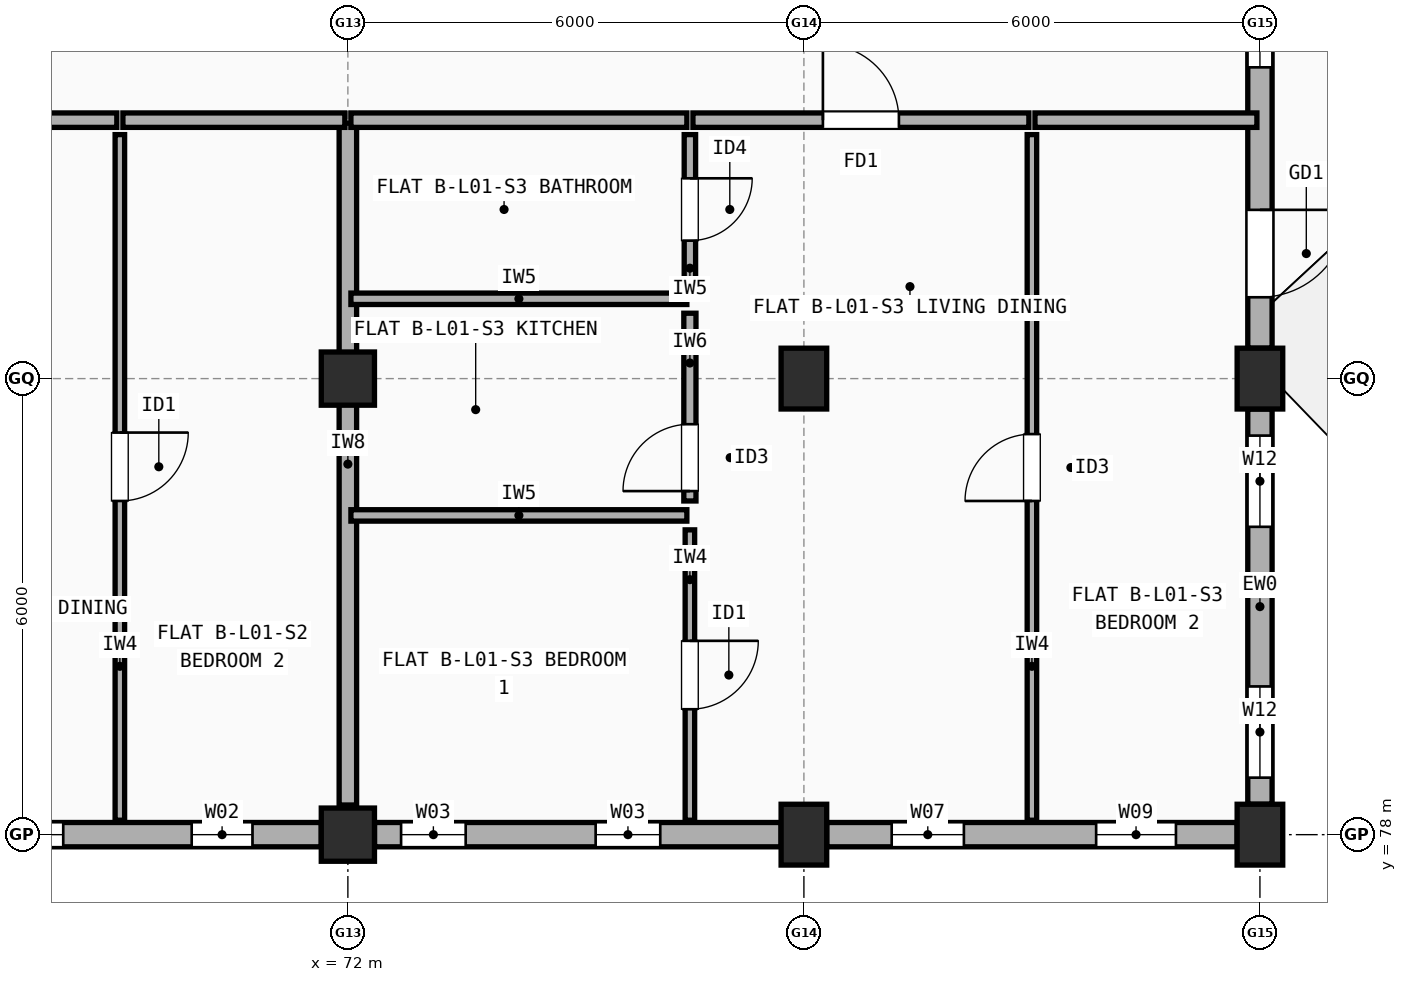
"""IFC4 building model, lengths in metres.
Left out: names, types, materials, properties, quantities, classifications, styles, units other than length and angle.
Written with IfcOpenShell. Run it as: python <this file> out.ifc"""

import sys

from ifc_helpers import new_model, si_unit, direction, frame, frame_2d, origin, origin_2d, place, context, subcontext, project, spatial, rectangle, extrude, element, fill, save


model = new_model("IFC4")
c1 = context("Model", 3, precision=1e-05, world=origin(), true_north=direction((0.0, 1.0)))
c2 = subcontext(c1, "Body", "Model", "MODEL_VIEW")
j1 = project(units=[si_unit("LENGTHUNIT", "METRE"), si_unit("PLANEANGLEUNIT", "RADIAN")], contexts=[c1])
p1 = place(None, origin())
s1 = spatial("IfcSite", under=j1, at=p1, CompositionType="ELEMENT")
p2 = place(p1, origin())
s2 = spatial("IfcBuilding", under=s1, at=p2, CompositionType="ELEMENT")
p3 = place(p2, frame((0.0, 0.0, 4.5)))
s3 = spatial("IfcBuildingStorey", under=s2, at=p3, CompositionType="ELEMENT", Elevation=4.5)
for number, where, z_axis, x_axis in (
    (1, (72.0, 78.0, 0.0), (0.0, 0.0, 1.0), (1.0, 0.0, 0.0)),
    (2, (72.0, 84.0, 0.0), (0.0, 0.0, 1.0), (1.0, 0.0, 0.0)),
):
    element("IfcColumn", number, at=place(p3, frame(where, z_axis=z_axis, x_axis=x_axis)), inside=s3, PredefinedType="COLUMN", context=c2, shape_type="SweptSolid", body=[
        extrude(rectangle(XDim=0.7, YDim=0.7, at=origin_2d()), origin(), (0.0, 0.0, 1.0), 2.945),
    ])
for number, where, z_axis, x_axis in (
    (3, (78.0, 78.0, 0.0), (0.0, 0.0, 1.0), (1.0, 0.0, 0.0)),
    (4, (78.0, 84.0, 0.0), (0.0, 0.0, 1.0), (1.0, 0.0, 0.0)),
    (5, (84.0, 78.0, 0.0), (0.0, 0.0, 1.0), (1.0, 0.0, 0.0)),
    (6, (84.0, 84.0, 0.0), (0.0, 0.0, 1.0), (1.0, 0.0, 0.0)),
):
    element("IfcColumn", number, at=place(p3, frame(where, z_axis=z_axis, x_axis=x_axis)), inside=s3, PredefinedType="COLUMN", context=c2, shape_type="SweptSolid", body=[
        extrude(rectangle(XDim=0.6, YDim=0.8, at=origin_2d()), origin(), (0.0, 0.0, 1.0), 2.945),
    ])
p4 = place(p3, frame((66.35, 78.0, 0.0), z_axis=(0.0, 0.0, 1.0), x_axis=(1.0, 0.0, 0.0)))
e7 = element("IfcWall", 7, at=p4, inside=s3, PredefinedType="STANDARD", context=c2, shape_type="SweptSolid", body=[
    extrude(rectangle(XDim=5.3, YDim=0.32, at=frame_2d((2.65, 0.0))), origin(), (0.0, 0.0, 1.0), 2.427),
])
p5 = place(p4, frame((0.705, 0.0, 0.9)))
e8 = element("IfcOpeningElement", 8, at=p5, cuts=e7, PredefinedType="OPENING", context=c2, shape_type="SweptSolid", body=[
    extrude(rectangle(XDim=1.2, YDim=1.35, at=frame_2d((0.6, 0.675))), frame((0.0, 0.17, 0.0), z_axis=(0.0, -1.0, 0.0), x_axis=(1.0, 0.0, 0.0)), (0.0, 0.0, 1.0), 0.34),
])
p6 = place(p4, frame((3.595, 0.0, 0.9)))
e9 = element("IfcOpeningElement", 9, at=p6, cuts=e7, PredefinedType="OPENING", context=c2, shape_type="SweptSolid", body=[
    extrude(rectangle(XDim=0.8, YDim=1.2, at=frame_2d((0.4, 0.6))), frame((0.0, 0.17, 0.0), z_axis=(0.0, -1.0, 0.0), x_axis=(1.0, 0.0, 0.0)), (0.0, 0.0, 1.0), 0.34),
])
p7 = place(p3, frame((72.35, 78.0, 0.0), z_axis=(0.0, 0.0, 1.0), x_axis=(1.0, 0.0, 0.0)))
e10 = element("IfcWall", 10, at=p7, inside=s3, PredefinedType="STANDARD", context=c2, shape_type="SweptSolid", body=[
    extrude(rectangle(XDim=5.35, YDim=0.32, at=frame_2d((2.675, 0.0))), origin(), (0.0, 0.0, 1.0), 2.427),
])
p8 = place(p7, frame((0.35, 0.0, 0.9)))
e11 = element("IfcOpeningElement", 11, at=p8, cuts=e10, PredefinedType="OPENING", context=c2, shape_type="SweptSolid", body=[
    extrude(rectangle(XDim=0.85, YDim=1.25, at=frame_2d((0.425, 0.625))), frame((0.0, 0.17, 0.0), z_axis=(0.0, -1.0, 0.0), x_axis=(1.0, 0.0, 0.0)), (0.0, 0.0, 1.0), 0.34),
])
p9 = place(p7, frame((2.91, 0.0, 0.9)))
e12 = element("IfcOpeningElement", 12, at=p9, cuts=e10, PredefinedType="OPENING", context=c2, shape_type="SweptSolid", body=[
    extrude(rectangle(XDim=0.85, YDim=1.25, at=frame_2d((0.425, 0.625))), frame((0.0, 0.17, 0.0), z_axis=(0.0, -1.0, 0.0), x_axis=(1.0, 0.0, 0.0)), (0.0, 0.0, 1.0), 0.34),
])
p10 = place(p3, frame((78.3, 78.0, 0.0), z_axis=(0.0, 0.0, 1.0), x_axis=(1.0, 0.0, 0.0)))
e13 = element("IfcWall", 13, at=p10, inside=s3, PredefinedType="STANDARD", context=c2, shape_type="SweptSolid", body=[
    extrude(rectangle(XDim=5.4, YDim=0.32, at=frame_2d((2.7, 0.0))), origin(), (0.0, 0.0, 1.0), 2.427),
])
p11 = place(p10, frame((0.855, 0.0, 0.9)))
e14 = element("IfcOpeningElement", 14, at=p11, cuts=e13, PredefinedType="OPENING", context=c2, shape_type="SweptSolid", body=[
    extrude(rectangle(XDim=0.95, YDim=1.35, at=frame_2d((0.475, 0.675))), frame((0.0, 0.17, 0.0), z_axis=(0.0, -1.0, 0.0), x_axis=(1.0, 0.0, 0.0)), (0.0, 0.0, 1.0), 0.34),
])
p12 = place(p10, frame((3.545, 0.0, 0.9)))
e15 = element("IfcOpeningElement", 15, at=p12, cuts=e13, PredefinedType="OPENING", context=c2, shape_type="SweptSolid", body=[
    extrude(rectangle(XDim=1.05, YDim=1.35, at=frame_2d((0.525, 0.675))), frame((0.0, 0.17, 0.0), z_axis=(0.0, -1.0, 0.0), x_axis=(1.0, 0.0, 0.0)), (0.0, 0.0, 1.0), 0.34),
])
p13 = place(p3, frame((84.0, 78.4, 0.0), z_axis=(0.0, 0.0, 1.0), x_axis=(0.0, 1.0, 0.0)))
e16 = element("IfcWall", 16, at=p13, inside=s3, PredefinedType="STANDARD", context=c2, shape_type="SweptSolid", body=[
    extrude(rectangle(XDim=5.2, YDim=0.32, at=frame_2d((2.6, 0.0))), origin(), (0.0, 0.0, 1.0), 2.427),
])
p14 = place(p13, frame((0.35, 0.0, 0.9)))
e17 = element("IfcOpeningElement", 17, at=p14, cuts=e16, PredefinedType="OPENING", context=c2, shape_type="SweptSolid", body=[
    extrude(rectangle(XDim=1.2, YDim=1.35, at=frame_2d((0.6, 0.675))), frame((0.0, 0.17, 0.0), z_axis=(0.0, -1.0, 0.0), x_axis=(1.0, 0.0, 0.0)), (0.0, 0.0, 1.0), 0.34),
])
p15 = place(p13, frame((3.65, 0.0, 0.9)))
e18 = element("IfcOpeningElement", 18, at=p15, cuts=e16, PredefinedType="OPENING", context=c2, shape_type="SweptSolid", body=[
    extrude(rectangle(XDim=1.2, YDim=1.35, at=frame_2d((0.6, 0.675))), frame((0.0, 0.17, 0.0), z_axis=(0.0, -1.0, 0.0), x_axis=(1.0, 0.0, 0.0)), (0.0, 0.0, 1.0), 0.34),
])
p16 = place(p3, frame((84.0, 84.4, 0.0), z_axis=(0.0, 0.0, 1.0), x_axis=(0.0, 1.0, 0.0)))
e19 = element("IfcWall", 19, at=p16, inside=s3, PredefinedType="STANDARD", context=c2, shape_type="SweptSolid", body=[
    extrude(rectangle(XDim=5.2, YDim=0.32, at=frame_2d((2.6, 0.0))), origin(), (0.0, 0.0, 1.0), 2.427),
])
p17 = place(p16, frame((0.67, 0.0, 0.0)))
e20 = element("IfcOpeningElement", 20, at=p17, cuts=e19, PredefinedType="OPENING", context=c2, shape_type="SweptSolid", body=[
    extrude(rectangle(XDim=1.15, YDim=2.15, at=frame_2d((0.575, 1.075))), frame((0.0, 0.17, 0.0), z_axis=(0.0, -1.0, 0.0), x_axis=(1.0, 0.0, 0.0)), (0.0, 0.0, 1.0), 0.34),
])
p18 = place(p16, frame((3.695, 0.0, 0.9)))
e21 = element("IfcOpeningElement", 21, at=p18, cuts=e19, PredefinedType="OPENING", context=c2, shape_type="SweptSolid", body=[
    extrude(rectangle(XDim=0.85, YDim=1.25, at=frame_2d((0.425, 0.625))), frame((0.0, 0.17, 0.0), z_axis=(0.0, -1.0, 0.0), x_axis=(1.0, 0.0, 0.0)), (0.0, 0.0, 1.0), 0.34),
])
p19 = place(p3, frame((72.0, 78.39, 0.0), z_axis=(0.0, 0.0, 1.0), x_axis=(0.0, 1.0, 0.0)))
e22 = element("IfcWall", 22, at=p19, inside=s3, PredefinedType="SOLIDWALL", context=c2, shape_type="SweptSolid", body=[
    extrude(rectangle(XDim=8.97, YDim=0.23, at=frame_2d((4.485, 0.0))), origin(), (0.0, 0.0, 1.0), 2.327),
])
p20 = place(p3, frame((64.54, 87.4, 0.0), z_axis=(0.0, 0.0, 1.0), x_axis=(1.0, 0.0, 0.0)))
e23 = element("IfcWall", 23, at=p20, inside=s3, PredefinedType="SOLIDWALL", context=c2, shape_type="SweptSolid", body=[
    extrude(rectangle(XDim=4.42, YDim=0.19, at=frame_2d((2.21, 0.0))), origin(), (0.0, 0.0, 1.0), 2.327),
])
p21 = place(p20, frame((1.72, 0.0, 0.0)))
e24 = element("IfcOpeningElement", 24, at=p21, cuts=e23, PredefinedType="OPENING", context=c2, shape_type="SweptSolid", body=[
    extrude(rectangle(XDim=0.98, YDim=2.15, at=frame_2d((0.49, 1.075))), frame((0.0, 0.105, 0.0), z_axis=(0.0, -1.0, 0.0), x_axis=(1.0, 0.0, 0.0)), (0.0, 0.0, 1.0), 0.21),
])
p22 = place(p3, frame((69.04, 87.4, 0.0), z_axis=(0.0, 0.0, 1.0), x_axis=(1.0, 0.0, 0.0)))
e25 = element("IfcWall", 25, at=p22, inside=s3, PredefinedType="SOLIDWALL", context=c2, shape_type="SweptSolid", body=[
    extrude(rectangle(XDim=2.92, YDim=0.19, at=frame_2d((1.46, 0.0))), origin(), (0.0, 0.0, 1.0), 2.327),
])
p23 = place(p3, frame((69.0, 78.19, 0.0), z_axis=(0.0, 0.0, 1.0), x_axis=(0.0, 1.0, 0.0)))
e26 = element("IfcWall", 26, at=p23, inside=s3, PredefinedType="PARTITIONING", context=c2, shape_type="SweptSolid", body=[
    extrude(rectangle(XDim=9.02, YDim=0.125, at=frame_2d((4.51, 0.0))), origin(), (0.0, 0.0, 1.0), 2.427),
])
p24 = place(p23, frame((4.2, 0.0, 0.0)))
e27 = element("IfcOpeningElement", 27, at=p24, cuts=e26, PredefinedType="OPENING", context=c2, shape_type="SweptSolid", body=[
    extrude(rectangle(XDim=0.9, YDim=2.1, at=frame_2d((0.45, 1.05))), frame((0.0, 0.073, 0.0), z_axis=(0.0, -1.0, 0.0), x_axis=(1.0, 0.0, 0.0)), (0.0, 0.0, 1.0), 0.145),
])
p25 = place(p3, frame((72.04, 87.4, 0.0), z_axis=(0.0, 0.0, 1.0), x_axis=(1.0, 0.0, 0.0)))
e28 = element("IfcWall", 28, at=p25, inside=s3, PredefinedType="SOLIDWALL", context=c2, shape_type="SweptSolid", body=[
    extrude(rectangle(XDim=4.42, YDim=0.19, at=frame_2d((2.21, 0.0))), origin(), (0.0, 0.0, 1.0), 2.327),
])
p26 = place(p3, frame((76.54, 87.4, 0.0), z_axis=(0.0, 0.0, 1.0), x_axis=(1.0, 0.0, 0.0)))
e29 = element("IfcWall", 29, at=p26, inside=s3, PredefinedType="SOLIDWALL", context=c2, shape_type="SweptSolid", body=[
    extrude(rectangle(XDim=4.42, YDim=0.19, at=frame_2d((2.21, 0.0))), origin(), (0.0, 0.0, 1.0), 2.427),
])
p27 = place(p26, frame((1.71, 0.0, 0.0)))
e30 = element("IfcOpeningElement", 30, at=p27, cuts=e29, PredefinedType="OPENING", context=c2, shape_type="SweptSolid", body=[
    extrude(rectangle(XDim=1.0, YDim=2.15, at=frame_2d((0.5, 1.075))), frame((0.0, 0.105, 0.0), z_axis=(0.0, -1.0, 0.0), x_axis=(1.0, 0.0, 0.0)), (0.0, 0.0, 1.0), 0.21),
])
p28 = place(p3, frame((76.5, 78.19, 0.0), z_axis=(0.0, 0.0, 1.0), x_axis=(0.0, 1.0, 0.0)))
e31 = element("IfcWall", 31, at=p28, inside=s3, PredefinedType="PARTITIONING", context=c2, shape_type="SweptSolid", body=[
    extrude(rectangle(XDim=3.82, YDim=0.125, at=frame_2d((1.91, 0.0))), origin(), (0.0, 0.0, 1.0), 2.945),
])
p29 = place(p28, frame((1.46, 0.0, 0.0)))
e32 = element("IfcOpeningElement", 32, at=p29, cuts=e31, PredefinedType="OPENING", context=c2, shape_type="SweptSolid", body=[
    extrude(rectangle(XDim=0.9, YDim=2.1, at=frame_2d((0.45, 1.05))), frame((0.0, 0.073, 0.0), z_axis=(0.0, -1.0, 0.0), x_axis=(1.0, 0.0, 0.0)), (0.0, 0.0, 1.0), 0.145),
])
p30 = place(p3, frame((76.5, 82.39, 0.0), z_axis=(0.0, 0.0, 1.0), x_axis=(0.0, 1.0, 0.0)))
e33 = element("IfcWall", 33, at=p30, inside=s3, PredefinedType="PLUMBINGWALL", context=c2, shape_type="SweptSolid", body=[
    extrude(rectangle(XDim=2.47, YDim=0.16, at=frame_2d((1.235, 0.0))), origin(), (0.0, 0.0, 1.0), 2.427),
])
p31 = place(p30, frame((0.13, 0.0, 0.0)))
e34 = element("IfcOpeningElement", 34, at=p31, cuts=e33, PredefinedType="OPENING", context=c2, shape_type="SweptSolid", body=[
    extrude(rectangle(XDim=0.88, YDim=2.1, at=frame_2d((0.44, 1.05))), frame((0.0, 0.09, 0.0), z_axis=(0.0, -1.0, 0.0), x_axis=(1.0, 0.0, 0.0)), (0.0, 0.0, 1.0), 0.18),
])
p32 = place(p3, frame((76.5, 85.24, 0.0), z_axis=(0.0, 0.0, 1.0), x_axis=(0.0, 1.0, 0.0)))
e35 = element("IfcWall", 35, at=p32, inside=s3, PredefinedType="PARTITIONING", context=c2, shape_type="SweptSolid", body=[
    extrude(rectangle(XDim=1.97, YDim=0.15, at=frame_2d((0.985, 0.0))), origin(), (0.0, 0.0, 1.0), 2.945),
])
p33 = place(p32, frame((0.575, 0.0, 0.0)))
e36 = element("IfcOpeningElement", 36, at=p33, cuts=e35, PredefinedType="OPENING", context=c2, shape_type="SweptSolid", body=[
    extrude(rectangle(XDim=0.82, YDim=2.08, at=frame_2d((0.41, 1.04))), frame((0.0, 0.085, 0.0), z_axis=(0.0, -1.0, 0.0), x_axis=(1.0, 0.0, 0.0)), (0.0, 0.0, 1.0), 0.17),
])
for number, where, z_axis, x_axis in (
    (37, (72.04, 82.2, 0.0), (0.0, 0.0, 1.0), (1.0, 0.0, 0.0)),
    (38, (72.04, 85.05, 0.0), (0.0, 0.0, 1.0), (1.0, 0.0, 0.0)),
):
    element("IfcWall", number, at=place(p3, frame(where, z_axis=z_axis, x_axis=x_axis)), inside=s3, PredefinedType="PARTITIONING", context=c2, shape_type="SweptSolid", body=[
        extrude(rectangle(XDim=4.42, YDim=0.15, at=frame_2d((2.21, 0.0))), origin(), (0.0, 0.0, 1.0), 2.327),
    ])
p34 = place(p3, frame((81.04, 87.4, 0.0), z_axis=(0.0, 0.0, 1.0), x_axis=(1.0, 0.0, 0.0)))
e39 = element("IfcWall", 39, at=p34, inside=s3, PredefinedType="SOLIDWALL", context=c2, shape_type="SweptSolid", body=[
    extrude(rectangle(XDim=2.92, YDim=0.19, at=frame_2d((1.46, 0.0))), origin(), (0.0, 0.0, 1.0), 2.427),
])
p35 = place(p3, frame((81.0, 78.19, 0.0), z_axis=(0.0, 0.0, 1.0), x_axis=(0.0, 1.0, 0.0)))
e40 = element("IfcWall", 40, at=p35, inside=s3, PredefinedType="PARTITIONING", context=c2, shape_type="SweptSolid", body=[
    extrude(rectangle(XDim=9.02, YDim=0.125, at=frame_2d((4.51, 0.0))), origin(), (0.0, 0.0, 1.0), 2.427),
])
p36 = place(p35, frame((4.2, 0.0, 0.0)))
e41 = element("IfcOpeningElement", 41, at=p36, cuts=e40, PredefinedType="OPENING", context=c2, shape_type="SweptSolid", body=[
    extrude(rectangle(XDim=0.88, YDim=2.1, at=frame_2d((0.44, 1.05))), frame((0.0, 0.073, 0.0), z_axis=(0.0, -1.0, 0.0), x_axis=(1.0, 0.0, 0.0)), (0.0, 0.0, 1.0), 0.145),
])
p37 = place(p5, origin())
e42 = element("IfcWindow", 42, at=p37, inside=s3, PartitioningType="SINGLE_PANEL", PredefinedType="WINDOW", context=c2, shape_type="SweptSolid", body=[
    extrude(rectangle(XDim=1.2, YDim=1.35, at=frame_2d((0.6, 0.675))), frame((0.0, 0.03, 0.0), z_axis=(0.0, -1.0, 0.0), x_axis=(1.0, 0.0, 0.0)), (0.0, 0.0, 1.0), 0.06),
])
fill(e8, e42)
p38 = place(p6, origin())
e43 = element("IfcWindow", 43, at=p38, inside=s3, PartitioningType="SINGLE_PANEL", PredefinedType="WINDOW", context=c2, shape_type="SweptSolid", body=[
    extrude(rectangle(XDim=0.8, YDim=1.2, at=frame_2d((0.4, 0.6))), frame((0.0, 0.03, 0.0), z_axis=(0.0, -1.0, 0.0), x_axis=(1.0, 0.0, 0.0)), (0.0, 0.0, 1.0), 0.06),
])
fill(e9, e43)
p39 = place(p8, origin())
e44 = element("IfcWindow", 44, at=p39, inside=s3, PartitioningType="SINGLE_PANEL", PredefinedType="WINDOW", context=c2, shape_type="SweptSolid", body=[
    extrude(rectangle(XDim=0.85, YDim=1.25, at=frame_2d((0.425, 0.625))), frame((0.0, 0.03, 0.0), z_axis=(0.0, -1.0, 0.0), x_axis=(1.0, 0.0, 0.0)), (0.0, 0.0, 1.0), 0.06),
])
fill(e11, e44)
p40 = place(p9, origin())
e45 = element("IfcWindow", 45, at=p40, inside=s3, PartitioningType="SINGLE_PANEL", PredefinedType="WINDOW", context=c2, shape_type="SweptSolid", body=[
    extrude(rectangle(XDim=0.85, YDim=1.25, at=frame_2d((0.425, 0.625))), frame((0.0, 0.03, 0.0), z_axis=(0.0, -1.0, 0.0), x_axis=(1.0, 0.0, 0.0)), (0.0, 0.0, 1.0), 0.06),
])
fill(e12, e45)
p41 = place(p11, origin())
e46 = element("IfcWindow", 46, at=p41, inside=s3, PartitioningType="SINGLE_PANEL", PredefinedType="WINDOW", context=c2, shape_type="SweptSolid", body=[
    extrude(rectangle(XDim=0.95, YDim=1.35, at=frame_2d((0.475, 0.675))), frame((0.0, 0.03, 0.0), z_axis=(0.0, -1.0, 0.0), x_axis=(1.0, 0.0, 0.0)), (0.0, 0.0, 1.0), 0.06),
])
fill(e14, e46)
p42 = place(p12, origin())
e47 = element("IfcWindow", 47, at=p42, inside=s3, PartitioningType="SINGLE_PANEL", PredefinedType="WINDOW", context=c2, shape_type="SweptSolid", body=[
    extrude(rectangle(XDim=1.05, YDim=1.35, at=frame_2d((0.525, 0.675))), frame((0.0, 0.03, 0.0), z_axis=(0.0, -1.0, 0.0), x_axis=(1.0, 0.0, 0.0)), (0.0, 0.0, 1.0), 0.06),
])
fill(e15, e47)
p43 = place(p14, origin())
e48 = element("IfcWindow", 48, at=p43, inside=s3, PartitioningType="SINGLE_PANEL", PredefinedType="WINDOW", context=c2, shape_type="SweptSolid", body=[
    extrude(rectangle(XDim=1.2, YDim=1.35, at=frame_2d((0.6, 0.675))), frame((0.0, 0.03, 0.0), z_axis=(0.0, -1.0, 0.0), x_axis=(1.0, 0.0, 0.0)), (0.0, 0.0, 1.0), 0.06),
])
fill(e17, e48)
p44 = place(p15, origin())
e49 = element("IfcWindow", 49, at=p44, inside=s3, PartitioningType="SINGLE_PANEL", PredefinedType="WINDOW", context=c2, shape_type="SweptSolid", body=[
    extrude(rectangle(XDim=1.2, YDim=1.35, at=frame_2d((0.6, 0.675))), frame((0.0, 0.03, 0.0), z_axis=(0.0, -1.0, 0.0), x_axis=(1.0, 0.0, 0.0)), (0.0, 0.0, 1.0), 0.06),
])
fill(e18, e49)
p45 = place(p17, frame((1.15, 0.0, 0.0), z_axis=(0.0, 0.0, 1.0), x_axis=(-1.0, 0.0, 0.0)))
e50 = element("IfcDoor", 50, at=p45, inside=s3, OperationType="SINGLE_SWING_RIGHT", PredefinedType="DOOR", context=c2, shape_type="SweptSolid", body=[
    extrude(rectangle(XDim=1.15, YDim=2.15, at=frame_2d((0.575, 1.075))), frame((0.0, 0.025, 0.0), z_axis=(0.0, -1.0, 0.0), x_axis=(1.0, 0.0, 0.0)), (0.0, 0.0, 1.0), 0.05),
])
fill(e20, e50)
p46 = place(p18, origin())
e51 = element("IfcWindow", 51, at=p46, inside=s3, PartitioningType="SINGLE_PANEL", PredefinedType="WINDOW", context=c2, shape_type="SweptSolid", body=[
    extrude(rectangle(XDim=0.85, YDim=1.25, at=frame_2d((0.425, 0.625))), frame((0.0, 0.03, 0.0), z_axis=(0.0, -1.0, 0.0), x_axis=(1.0, 0.0, 0.0)), (0.0, 0.0, 1.0), 0.06),
])
fill(e21, e51)
p47 = place(p24, origin())
e52 = element("IfcDoor", 52, at=p47, inside=s3, OperationType="SINGLE_SWING_RIGHT", PredefinedType="DOOR", context=c2, shape_type="SweptSolid", body=[
    extrude(rectangle(XDim=0.9, YDim=2.1, at=frame_2d((0.45, 1.05))), frame((0.0, 0.025, 0.0), z_axis=(0.0, -1.0, 0.0), x_axis=(1.0, 0.0, 0.0)), (0.0, 0.0, 1.0), 0.05),
])
fill(e27, e52)
p48 = place(p27, origin())
e53 = element("IfcDoor", 53, at=p48, inside=s3, OperationType="SINGLE_SWING_LEFT", PredefinedType="DOOR", context=c2, shape_type="SweptSolid", body=[
    extrude(rectangle(XDim=1.0, YDim=2.15, at=frame_2d((0.5, 1.075))), frame((0.0, 0.025, 0.0), z_axis=(0.0, -1.0, 0.0), x_axis=(1.0, 0.0, 0.0)), (0.0, 0.0, 1.0), 0.05),
])
fill(e30, e53)
p49 = place(p29, origin())
e54 = element("IfcDoor", 54, at=p49, inside=s3, OperationType="SINGLE_SWING_RIGHT", PredefinedType="DOOR", context=c2, shape_type="SweptSolid", body=[
    extrude(rectangle(XDim=0.9, YDim=2.1, at=frame_2d((0.45, 1.05))), frame((0.0, 0.025, 0.0), z_axis=(0.0, -1.0, 0.0), x_axis=(1.0, 0.0, 0.0)), (0.0, 0.0, 1.0), 0.05),
])
fill(e32, e54)
p50 = place(p31, origin())
e55 = element("IfcDoor", 55, at=p50, inside=s3, OperationType="SINGLE_SWING_LEFT", PredefinedType="DOOR", context=c2, shape_type="SweptSolid", body=[
    extrude(rectangle(XDim=0.88, YDim=2.1, at=frame_2d((0.44, 1.05))), frame((0.0, 0.025, 0.0), z_axis=(0.0, -1.0, 0.0), x_axis=(1.0, 0.0, 0.0)), (0.0, 0.0, 1.0), 0.05),
])
fill(e34, e55)
p51 = place(p33, origin())
e56 = element("IfcDoor", 56, at=p51, inside=s3, OperationType="SINGLE_SWING_RIGHT", PredefinedType="DOOR", context=c2, shape_type="SweptSolid", body=[
    extrude(rectangle(XDim=0.82, YDim=2.08, at=frame_2d((0.41, 1.04))), frame((0.0, 0.025, 0.0), z_axis=(0.0, -1.0, 0.0), x_axis=(1.0, 0.0, 0.0)), (0.0, 0.0, 1.0), 0.05),
])
fill(e36, e56)
p52 = place(p36, origin())
e57 = element("IfcDoor", 57, at=p52, inside=s3, OperationType="SINGLE_SWING_LEFT", PredefinedType="DOOR", context=c2, shape_type="SweptSolid", body=[
    extrude(rectangle(XDim=0.88, YDim=2.1, at=frame_2d((0.44, 1.05))), frame((0.0, 0.025, 0.0), z_axis=(0.0, -1.0, 0.0), x_axis=(1.0, 0.0, 0.0)), (0.0, 0.0, 1.0), 0.05),
])
fill(e41, e57)
save(model, sys.argv[1])
